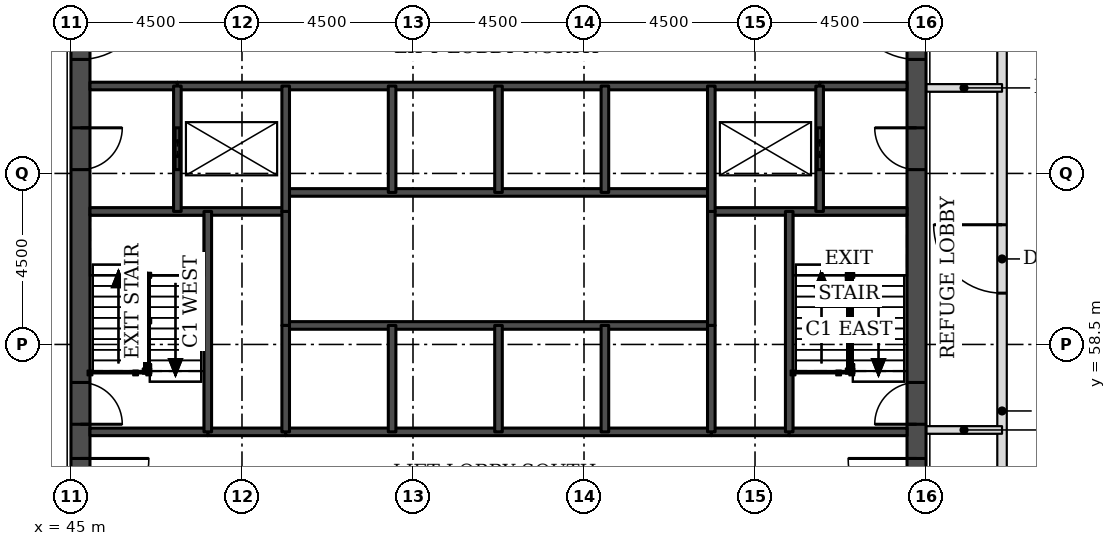
"""IFC4 building model, lengths in metres.
Left out: names, types, materials, properties, quantities, classifications, styles, units other than length and angle.
Written with IfcOpenShell. Run it as: python <this file> out.ifc"""

import sys

from ifc_helpers import new_model, si_unit, direction, frame, frame_2d, origin, place, context, subcontext, project, spatial, rectangle, extrude, element, fill, save


model = new_model("IFC4")
c1 = context("Model", 3, precision=1e-05, world=origin(), true_north=direction((0.0, 1.0)))
c2 = subcontext(c1, "Body", "Model", "MODEL_VIEW")
j1 = project(units=[si_unit("LENGTHUNIT", "METRE"), si_unit("PLANEANGLEUNIT", "RADIAN")], contexts=[c1])
p1 = place(None, origin())
s1 = spatial("IfcSite", under=j1, at=p1, CompositionType="ELEMENT")
p2 = place(p1, origin())
s2 = spatial("IfcBuilding", under=s1, at=p2, CompositionType="ELEMENT")
p3 = place(p2, frame((0.0, 0.0, 69.3)))
s3 = spatial("IfcBuildingStorey", under=s2, at=p3, CompositionType="ELEMENT", Elevation=69.3)
p4 = place(p3, frame((45.25, 49.5, 0.0), z_axis=(0.0, 0.0, 1.0), x_axis=(0.0, 1.0, 0.0)))
e1 = element("IfcWall", 1, at=p4, inside=s3, PredefinedType="SHEAR", context=c2, shape_type="SweptSolid", body=[
    extrude(rectangle(XDim=22.5, YDim=0.5, at=frame_2d((11.25, 0.0))), origin(), (0.0, 0.0, 1.0), 5.0),
])
p5 = place(p4, frame((4.2, 0.0, 0.0)))
e2 = element("IfcOpeningElement", 2, at=p5, cuts=e1, PredefinedType="OPENING", context=c2, shape_type="SweptSolid", body=[
    extrude(rectangle(XDim=1.8, YDim=2.1, at=frame_2d((0.9, 1.05))), frame((0.0, 0.26, 0.0), z_axis=(0.0, -1.0, 0.0), x_axis=(1.0, 0.0, 0.0)), (0.0, 0.0, 1.0), 0.52),
])
p6 = place(p4, frame((6.9, 0.0, 0.0)))
e3 = element("IfcOpeningElement", 3, at=p6, cuts=e1, PredefinedType="OPENING", context=c2, shape_type="SweptSolid", body=[
    extrude(rectangle(XDim=1.1, YDim=2.1, at=frame_2d((0.55, 1.05))), frame((0.0, 0.26, 0.0), z_axis=(0.0, -1.0, 0.0), x_axis=(1.0, 0.0, 0.0)), (0.0, 0.0, 1.0), 0.52),
])
p7 = place(p4, frame((13.6, 0.0, 0.0)))
e4 = element("IfcOpeningElement", 4, at=p7, cuts=e1, PredefinedType="OPENING", context=c2, shape_type="SweptSolid", body=[
    extrude(rectangle(XDim=1.1, YDim=2.1, at=frame_2d((0.55, 1.05))), frame((0.0, 0.26, 0.0), z_axis=(0.0, -1.0, 0.0), x_axis=(1.0, 0.0, 0.0)), (0.0, 0.0, 1.0), 0.52),
])
p8 = place(p4, frame((16.5, 0.0, 0.0)))
e5 = element("IfcOpeningElement", 5, at=p8, cuts=e1, PredefinedType="OPENING", context=c2, shape_type="SweptSolid", body=[
    extrude(rectangle(XDim=1.8, YDim=2.1, at=frame_2d((0.9, 1.05))), frame((0.0, 0.26, 0.0), z_axis=(0.0, -1.0, 0.0), x_axis=(1.0, 0.0, 0.0)), (0.0, 0.0, 1.0), 0.52),
])
p9 = place(p3, frame((67.25, 49.5, 0.0), z_axis=(0.0, 0.0, 1.0), x_axis=(0.0, 1.0, 0.0)))
e6 = element("IfcWall", 6, at=p9, inside=s3, PredefinedType="SHEAR", context=c2, shape_type="SweptSolid", body=[
    extrude(rectangle(XDim=22.5, YDim=0.5, at=frame_2d((11.25, 0.0))), origin(), (0.0, 0.0, 1.0), 5.0),
])
p10 = place(p9, frame((4.2, 0.0, 0.0)))
e7 = element("IfcOpeningElement", 7, at=p10, cuts=e6, PredefinedType="OPENING", context=c2, shape_type="SweptSolid", body=[
    extrude(rectangle(XDim=1.8, YDim=2.1, at=frame_2d((0.9, 1.05))), frame((0.0, 0.26, 0.0), z_axis=(0.0, -1.0, 0.0), x_axis=(1.0, 0.0, 0.0)), (0.0, 0.0, 1.0), 0.52),
])
p11 = place(p9, frame((6.9, 0.0, 0.0)))
e8 = element("IfcOpeningElement", 8, at=p11, cuts=e6, PredefinedType="OPENING", context=c2, shape_type="SweptSolid", body=[
    extrude(rectangle(XDim=1.1, YDim=2.1, at=frame_2d((0.55, 1.05))), frame((0.0, 0.26, 0.0), z_axis=(0.0, -1.0, 0.0), x_axis=(1.0, 0.0, 0.0)), (0.0, 0.0, 1.0), 0.52),
])
p12 = place(p9, frame((13.6, 0.0, 0.0)))
e9 = element("IfcOpeningElement", 9, at=p12, cuts=e6, PredefinedType="OPENING", context=c2, shape_type="SweptSolid", body=[
    extrude(rectangle(XDim=1.1, YDim=2.1, at=frame_2d((0.55, 1.05))), frame((0.0, 0.26, 0.0), z_axis=(0.0, -1.0, 0.0), x_axis=(1.0, 0.0, 0.0)), (0.0, 0.0, 1.0), 0.52),
])
p13 = place(p9, frame((16.5, 0.0, 0.0)))
e10 = element("IfcOpeningElement", 10, at=p13, cuts=e6, PredefinedType="OPENING", context=c2, shape_type="SweptSolid", body=[
    extrude(rectangle(XDim=1.8, YDim=2.1, at=frame_2d((0.9, 1.05))), frame((0.0, 0.26, 0.0), z_axis=(0.0, -1.0, 0.0), x_axis=(1.0, 0.0, 0.0)), (0.0, 0.0, 1.0), 0.52),
])
p14 = place(p3, frame((69.5, 47.5, 0.0), z_axis=(0.0, 0.0, 1.0), x_axis=(0.0, 1.0, 0.0)))
e11 = element("IfcWall", 11, at=p14, inside=s3, PredefinedType="PARTITIONING", context=c2, shape_type="SweptSolid", body=[
    extrude(rectangle(XDim=26.5, YDim=0.25, at=frame_2d((13.25, 0.0))), origin(), (0.0, 0.0, 1.0), 4.85),
])
p15 = place(p14, frame((12.35, 0.0, 0.0)))
e12 = element("IfcOpeningElement", 12, at=p15, cuts=e11, PredefinedType="OPENING", context=c2, shape_type="SweptSolid", body=[
    extrude(rectangle(XDim=1.8, YDim=2.1, at=frame_2d((0.9, 1.05))), frame((0.0, 0.135, 0.0), z_axis=(0.0, -1.0, 0.0), x_axis=(1.0, 0.0, 0.0)), (0.0, 0.0, 1.0), 0.27),
])
for number, where, z_axis, x_axis in (
    (13, (67.5, 56.25, 0.0), (0.0, 0.0, 1.0), (1.0, 0.0, 0.0)),
    (14, (67.5, 65.25, 0.0), (0.0, 0.0, 1.0), (1.0, 0.0, 0.0)),
):
    element("IfcWall", number, at=place(p3, frame(where, z_axis=z_axis, x_axis=x_axis)), inside=s3, PredefinedType="PARTITIONING", context=c2, shape_type="SweptSolid", body=[
        extrude(rectangle(XDim=2.0, YDim=0.2, at=frame_2d((1.0, 0.0))), origin(), (0.0, 0.0, 1.0), 4.85),
    ])
for number, where, z_axis, x_axis in (
    (15, (48.6, 56.2, 0.0), (0.0, 0.0, 1.0), (1.0, 0.0, 0.0)),
    (16, (61.85, 56.2, 0.0), (0.0, 0.0, 1.0), (1.0, 0.0, 0.0)),
):
    element("IfcWall", number, at=place(p3, frame(where, z_axis=z_axis, x_axis=x_axis)), inside=s3, PredefinedType="SOLIDWALL", context=c2, shape_type="SweptSolid", body=[
        extrude(rectangle(XDim=2.05, YDim=0.2, at=frame_2d((1.025, 0.0))), origin(), (0.0, 0.0, 1.0), 4.85),
    ])
p16 = place(p3, frame((45.5, 56.2, 0.0), z_axis=(0.0, 0.0, 1.0), x_axis=(1.0, 0.0, 0.0)))
e17 = element("IfcWall", 17, at=p16, inside=s3, PredefinedType="SOLIDWALL", context=c2, shape_type="SweptSolid", body=[
    extrude(rectangle(XDim=3.1, YDim=0.2, at=frame_2d((1.55, 0.0))), origin(), (0.0, 0.0, 1.0), 4.85),
])
p17 = place(p3, frame((50.65, 56.2, 0.0), z_axis=(0.0, 0.0, 1.0), x_axis=(1.0, 0.0, 0.0)))
e18 = element("IfcWall", 18, at=p17, inside=s3, PredefinedType="SOLIDWALL", context=c2, shape_type="SweptSolid", body=[
    extrude(rectangle(XDim=11.2, YDim=0.2, at=frame_2d((5.6, 0.0))), origin(), (0.0, 0.0, 1.0), 4.85),
])
p18 = place(p3, frame((63.9, 56.2, 0.0), z_axis=(0.0, 0.0, 1.0), x_axis=(1.0, 0.0, 0.0)))
e19 = element("IfcWall", 19, at=p18, inside=s3, PredefinedType="SOLIDWALL", context=c2, shape_type="SweptSolid", body=[
    extrude(rectangle(XDim=3.1, YDim=0.2, at=frame_2d((1.55, 0.0))), origin(), (0.0, 0.0, 1.0), 4.85),
])
p19 = place(p3, frame((50.65, 59.0, 0.0), z_axis=(0.0, 0.0, 1.0), x_axis=(1.0, 0.0, 0.0)))
e20 = element("IfcWall", 20, at=p19, inside=s3, PredefinedType="SOLIDWALL", context=c2, shape_type="SweptSolid", body=[
    extrude(rectangle(XDim=11.2, YDim=0.2, at=frame_2d((5.6, 0.0))), origin(), (0.0, 0.0, 1.0), 5.0),
])
for number, where, z_axis, x_axis in (
    (21, (45.5, 62.0, 0.0), (0.0, 0.0, 1.0), (1.0, 0.0, 0.0)),
    (22, (61.85, 62.0, 0.0), (0.0, 0.0, 1.0), (1.0, 0.0, 0.0)),
):
    element("IfcWall", number, at=place(p3, frame(where, z_axis=z_axis, x_axis=x_axis)), inside=s3, PredefinedType="SOLIDWALL", context=c2, shape_type="SweptSolid", body=[
        extrude(rectangle(XDim=5.15, YDim=0.2, at=frame_2d((2.575, 0.0))), origin(), (0.0, 0.0, 1.0), 4.85),
    ])
p20 = place(p3, frame((50.65, 62.5, 0.0), z_axis=(0.0, 0.0, 1.0), x_axis=(1.0, 0.0, 0.0)))
e23 = element("IfcWall", 23, at=p20, inside=s3, PredefinedType="SOLIDWALL", context=c2, shape_type="SweptSolid", body=[
    extrude(rectangle(XDim=11.2, YDim=0.2, at=frame_2d((5.6, 0.0))), origin(), (0.0, 0.0, 1.0), 5.0),
])
for number, where, z_axis, x_axis in (
    (24, (45.5, 65.3, 0.0), (0.0, 0.0, 1.0), (1.0, 0.0, 0.0)),
    (25, (64.7, 65.3, 0.0), (0.0, 0.0, 1.0), (1.0, 0.0, 0.0)),
):
    element("IfcWall", number, at=place(p3, frame(where, z_axis=z_axis, x_axis=x_axis)), inside=s3, PredefinedType="SOLIDWALL", context=c2, shape_type="SweptSolid", body=[
        extrude(rectangle(XDim=2.3, YDim=0.2, at=frame_2d((1.15, 0.0))), origin(), (0.0, 0.0, 1.0), 4.85),
    ])
p21 = place(p3, frame((47.8, 65.3, 0.0), z_axis=(0.0, 0.0, 1.0), x_axis=(1.0, 0.0, 0.0)))
e26 = element("IfcWall", 26, at=p21, inside=s3, PredefinedType="SOLIDWALL", context=c2, shape_type="SweptSolid", body=[
    extrude(rectangle(XDim=16.9, YDim=0.2, at=frame_2d((8.45, 0.0))), origin(), (0.0, 0.0, 1.0), 4.85),
])
p22 = place(p3, frame((47.8, 62.0, 0.0), z_axis=(0.0, 0.0, 1.0), x_axis=(0.0, 1.0, 0.0)))
e27 = element("IfcWall", 27, at=p22, inside=s3, PredefinedType="SOLIDWALL", context=c2, shape_type="SweptSolid", body=[
    extrude(rectangle(XDim=3.3, YDim=0.2, at=frame_2d((1.65, 0.0))), origin(), (0.0, 0.0, 1.0), 4.85),
])
p23 = place(p22, frame((1.1, 0.0, 0.0)))
e28 = element("IfcOpeningElement", 28, at=p23, cuts=e27, PredefinedType="OPENING", context=c2, shape_type="SweptSolid", body=[
    extrude(rectangle(XDim=1.1, YDim=2.1, at=frame_2d((0.55, 1.05))), frame((0.0, 0.11, 0.0), z_axis=(0.0, -1.0, 0.0), x_axis=(1.0, 0.0, 0.0)), (0.0, 0.0, 1.0), 0.22),
])
p24 = place(p3, frame((48.6, 56.2, 0.0), z_axis=(0.0, 0.0, 1.0), x_axis=(0.0, 1.0, 0.0)))
e29 = element("IfcWall", 29, at=p24, inside=s3, PredefinedType="SOLIDWALL", context=c2, shape_type="SweptSolid", body=[
    extrude(rectangle(XDim=5.8, YDim=0.2, at=frame_2d((2.9, 0.0))), origin(), (0.0, 0.0, 1.0), 4.85),
])
p25 = place(p3, frame((50.65, 59.0, 0.0), z_axis=(0.0, 0.0, 1.0), x_axis=(0.0, 1.0, 0.0)))
e30 = element("IfcWall", 30, at=p25, inside=s3, PredefinedType="SOLIDWALL", context=c2, shape_type="SweptSolid", body=[
    extrude(rectangle(XDim=3.0, YDim=0.2, at=frame_2d((1.5, 0.0))), origin(), (0.0, 0.0, 1.0), 5.0),
])
p26 = place(p3, frame((50.65, 56.2, 0.0), z_axis=(0.0, 0.0, 1.0), x_axis=(0.0, 1.0, 0.0)))
e31 = element("IfcWall", 31, at=p26, inside=s3, PredefinedType="SOLIDWALL", context=c2, shape_type="SweptSolid", body=[
    extrude(rectangle(XDim=2.8, YDim=0.2, at=frame_2d((1.4, 0.0))), origin(), (0.0, 0.0, 1.0), 4.85),
])
p27 = place(p3, frame((50.65, 62.0, 0.0), z_axis=(0.0, 0.0, 1.0), x_axis=(0.0, 1.0, 0.0)))
e32 = element("IfcWall", 32, at=p27, inside=s3, PredefinedType="SOLIDWALL", context=c2, shape_type="SweptSolid", body=[
    extrude(rectangle(XDim=3.3, YDim=0.2, at=frame_2d((1.65, 0.0))), origin(), (0.0, 0.0, 1.0), 4.85),
])
for number, where, z_axis, x_axis in (
    (33, (53.45, 56.2, 0.0), (0.0, 0.0, 1.0), (0.0, 1.0, 0.0)),
    (34, (53.45, 62.5, 0.0), (0.0, 0.0, 1.0), (0.0, 1.0, 0.0)),
    (35, (56.25, 56.2, 0.0), (0.0, 0.0, 1.0), (0.0, 1.0, 0.0)),
    (36, (56.25, 62.5, 0.0), (0.0, 0.0, 1.0), (0.0, 1.0, 0.0)),
    (37, (59.05, 56.2, 0.0), (0.0, 0.0, 1.0), (0.0, 1.0, 0.0)),
    (38, (59.05, 62.5, 0.0), (0.0, 0.0, 1.0), (0.0, 1.0, 0.0)),
):
    element("IfcWall", number, at=place(p3, frame(where, z_axis=z_axis, x_axis=x_axis)), inside=s3, PredefinedType="SOLIDWALL", context=c2, shape_type="SweptSolid", body=[
        extrude(rectangle(XDim=2.8, YDim=0.2, at=frame_2d((1.4, 0.0))), origin(), (0.0, 0.0, 1.0), 4.85),
    ])
p28 = place(p3, frame((61.85, 59.0, 0.0), z_axis=(0.0, 0.0, 1.0), x_axis=(0.0, 1.0, 0.0)))
e39 = element("IfcWall", 39, at=p28, inside=s3, PredefinedType="SOLIDWALL", context=c2, shape_type="SweptSolid", body=[
    extrude(rectangle(XDim=3.0, YDim=0.2, at=frame_2d((1.5, 0.0))), origin(), (0.0, 0.0, 1.0), 5.0),
])
p29 = place(p3, frame((61.85, 56.2, 0.0), z_axis=(0.0, 0.0, 1.0), x_axis=(0.0, 1.0, 0.0)))
e40 = element("IfcWall", 40, at=p29, inside=s3, PredefinedType="SOLIDWALL", context=c2, shape_type="SweptSolid", body=[
    extrude(rectangle(XDim=2.8, YDim=0.2, at=frame_2d((1.4, 0.0))), origin(), (0.0, 0.0, 1.0), 4.85),
])
p30 = place(p3, frame((61.85, 62.0, 0.0), z_axis=(0.0, 0.0, 1.0), x_axis=(0.0, 1.0, 0.0)))
e41 = element("IfcWall", 41, at=p30, inside=s3, PredefinedType="SOLIDWALL", context=c2, shape_type="SweptSolid", body=[
    extrude(rectangle(XDim=3.3, YDim=0.2, at=frame_2d((1.65, 0.0))), origin(), (0.0, 0.0, 1.0), 4.85),
])
p31 = place(p3, frame((63.9, 56.2, 0.0), z_axis=(0.0, 0.0, 1.0), x_axis=(0.0, 1.0, 0.0)))
e42 = element("IfcWall", 42, at=p31, inside=s3, PredefinedType="SOLIDWALL", context=c2, shape_type="SweptSolid", body=[
    extrude(rectangle(XDim=5.8, YDim=0.2, at=frame_2d((2.9, 0.0))), origin(), (0.0, 0.0, 1.0), 4.85),
])
p32 = place(p3, frame((64.7, 62.0, 0.0), z_axis=(0.0, 0.0, 1.0), x_axis=(0.0, 1.0, 0.0)))
e43 = element("IfcWall", 43, at=p32, inside=s3, PredefinedType="SOLIDWALL", context=c2, shape_type="SweptSolid", body=[
    extrude(rectangle(XDim=3.3, YDim=0.2, at=frame_2d((1.65, 0.0))), origin(), (0.0, 0.0, 1.0), 4.85),
])
p33 = place(p32, frame((1.1, 0.0, 0.0)))
e44 = element("IfcOpeningElement", 44, at=p33, cuts=e43, PredefinedType="OPENING", context=c2, shape_type="SweptSolid", body=[
    extrude(rectangle(XDim=1.1, YDim=2.1, at=frame_2d((0.55, 1.05))), frame((0.0, 0.11, 0.0), z_axis=(0.0, -1.0, 0.0), x_axis=(1.0, 0.0, 0.0)), (0.0, 0.0, 1.0), 0.22),
])
p34 = place(p15, origin())
e45 = element("IfcDoor", 45, at=p34, inside=s3, OperationType="SINGLE_SWING_RIGHT", PredefinedType="DOOR", context=c2, shape_type="SweptSolid", body=[
    extrude(rectangle(XDim=1.8, YDim=2.1, at=frame_2d((0.9, 1.05))), frame((0.0, 0.025, 0.0), z_axis=(0.0, -1.0, 0.0), x_axis=(1.0, 0.0, 0.0)), (0.0, 0.0, 1.0), 0.05),
])
fill(e12, e45)
p35 = place(p23, origin())
e46 = element("IfcDoor", 46, at=p35, inside=s3, OperationType="DOUBLE_DOOR_SLIDING", PredefinedType="DOOR", context=c2, shape_type="SweptSolid", body=[
    extrude(rectangle(XDim=1.1, YDim=2.1, at=frame_2d((0.55, 1.05))), frame((0.0, 0.025, 0.0), z_axis=(0.0, -1.0, 0.0), x_axis=(1.0, 0.0, 0.0)), (0.0, 0.0, 1.0), 0.05),
])
fill(e28, e46)
p36 = place(p33, origin())
e47 = element("IfcDoor", 47, at=p36, inside=s3, OperationType="DOUBLE_DOOR_SLIDING", PredefinedType="DOOR", context=c2, shape_type="SweptSolid", body=[
    extrude(rectangle(XDim=1.1, YDim=2.1, at=frame_2d((0.55, 1.05))), frame((0.0, 0.025, 0.0), z_axis=(0.0, -1.0, 0.0), x_axis=(1.0, 0.0, 0.0)), (0.0, 0.0, 1.0), 0.05),
])
fill(e44, e47)
p37 = place(p5, frame((1.8, 0.0, 0.0), z_axis=(0.0, 0.0, 1.0), x_axis=(-1.0, 0.0, 0.0)))
e48 = element("IfcDoor", 48, at=p37, inside=s3, OperationType="SINGLE_SWING_LEFT", PredefinedType="DOOR", context=c2, shape_type="SweptSolid", body=[
    extrude(rectangle(XDim=1.8, YDim=2.1, at=frame_2d((0.9, 1.05))), frame((0.0, 0.025, 0.0), z_axis=(0.0, -1.0, 0.0), x_axis=(1.0, 0.0, 0.0)), (0.0, 0.0, 1.0), 0.05),
])
fill(e2, e48)
p38 = place(p6, frame((1.1, 0.0, 0.0), z_axis=(0.0, 0.0, 1.0), x_axis=(-1.0, 0.0, 0.0)))
e49 = element("IfcDoor", 49, at=p38, inside=s3, OperationType="SINGLE_SWING_RIGHT", PredefinedType="DOOR", context=c2, shape_type="SweptSolid", body=[
    extrude(rectangle(XDim=1.1, YDim=2.1, at=frame_2d((0.55, 1.05))), frame((0.0, 0.025, 0.0), z_axis=(0.0, -1.0, 0.0), x_axis=(1.0, 0.0, 0.0)), (0.0, 0.0, 1.0), 0.05),
])
fill(e3, e49)
p39 = place(p7, frame((1.1, 0.0, 0.0), z_axis=(0.0, 0.0, 1.0), x_axis=(-1.0, 0.0, 0.0)))
e50 = element("IfcDoor", 50, at=p39, inside=s3, OperationType="SINGLE_SWING_LEFT", PredefinedType="DOOR", context=c2, shape_type="SweptSolid", body=[
    extrude(rectangle(XDim=1.1, YDim=2.1, at=frame_2d((0.55, 1.05))), frame((0.0, 0.025, 0.0), z_axis=(0.0, -1.0, 0.0), x_axis=(1.0, 0.0, 0.0)), (0.0, 0.0, 1.0), 0.05),
])
fill(e4, e50)
p40 = place(p8, frame((1.8, 0.0, 0.0), z_axis=(0.0, 0.0, 1.0), x_axis=(-1.0, 0.0, 0.0)))
e51 = element("IfcDoor", 51, at=p40, inside=s3, OperationType="SINGLE_SWING_LEFT", PredefinedType="DOOR", context=c2, shape_type="SweptSolid", body=[
    extrude(rectangle(XDim=1.8, YDim=2.1, at=frame_2d((0.9, 1.05))), frame((0.0, 0.025, 0.0), z_axis=(0.0, -1.0, 0.0), x_axis=(1.0, 0.0, 0.0)), (0.0, 0.0, 1.0), 0.05),
])
fill(e5, e51)
p41 = place(p10, origin())
e52 = element("IfcDoor", 52, at=p41, inside=s3, OperationType="SINGLE_SWING_RIGHT", PredefinedType="DOOR", context=c2, shape_type="SweptSolid", body=[
    extrude(rectangle(XDim=1.8, YDim=2.1, at=frame_2d((0.9, 1.05))), frame((0.0, 0.025, 0.0), z_axis=(0.0, -1.0, 0.0), x_axis=(1.0, 0.0, 0.0)), (0.0, 0.0, 1.0), 0.05),
])
fill(e7, e52)
p42 = place(p11, origin())
e53 = element("IfcDoor", 53, at=p42, inside=s3, OperationType="SINGLE_SWING_LEFT", PredefinedType="DOOR", context=c2, shape_type="SweptSolid", body=[
    extrude(rectangle(XDim=1.1, YDim=2.1, at=frame_2d((0.55, 1.05))), frame((0.0, 0.025, 0.0), z_axis=(0.0, -1.0, 0.0), x_axis=(1.0, 0.0, 0.0)), (0.0, 0.0, 1.0), 0.05),
])
fill(e8, e53)
p43 = place(p12, origin())
e54 = element("IfcDoor", 54, at=p43, inside=s3, OperationType="SINGLE_SWING_RIGHT", PredefinedType="DOOR", context=c2, shape_type="SweptSolid", body=[
    extrude(rectangle(XDim=1.1, YDim=2.1, at=frame_2d((0.55, 1.05))), frame((0.0, 0.025, 0.0), z_axis=(0.0, -1.0, 0.0), x_axis=(1.0, 0.0, 0.0)), (0.0, 0.0, 1.0), 0.05),
])
fill(e9, e54)
p44 = place(p13, origin())
e55 = element("IfcDoor", 55, at=p44, inside=s3, OperationType="SINGLE_SWING_RIGHT", PredefinedType="DOOR", context=c2, shape_type="SweptSolid", body=[
    extrude(rectangle(XDim=1.8, YDim=2.1, at=frame_2d((0.9, 1.05))), frame((0.0, 0.025, 0.0), z_axis=(0.0, -1.0, 0.0), x_axis=(1.0, 0.0, 0.0)), (0.0, 0.0, 1.0), 0.05),
])
fill(e10, e55)
save(model, sys.argv[1])
